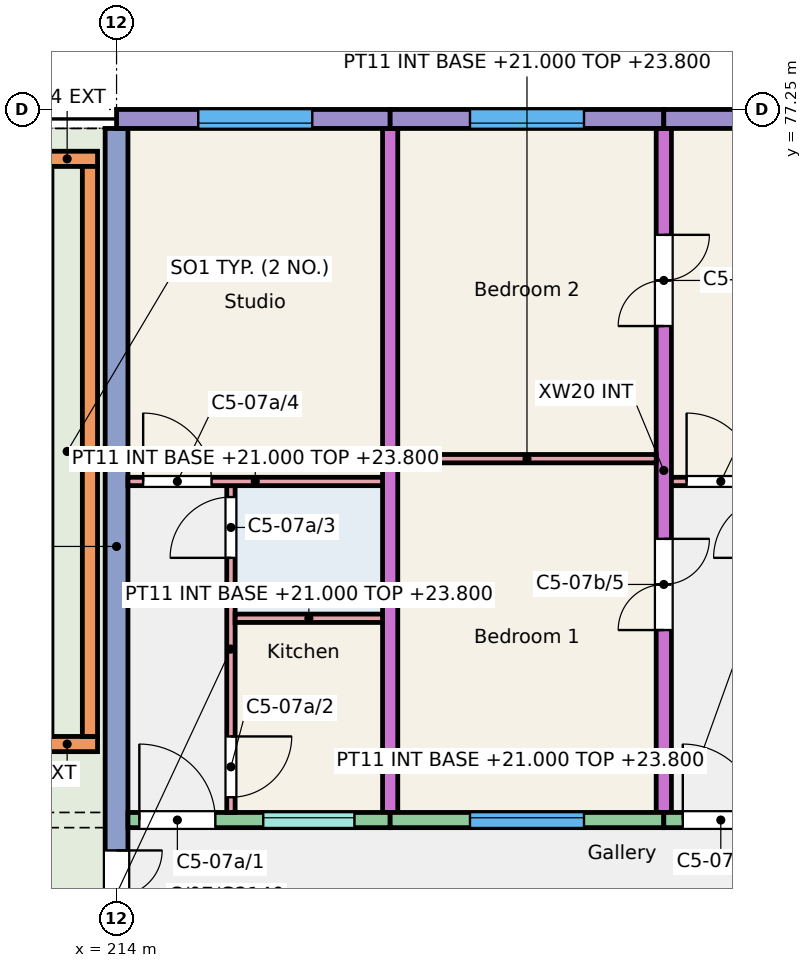
"""IFC4 building model, lengths in metres.
Left out: names, types, materials, properties, quantities, classifications, styles, units other than length and angle.
Written with IfcOpenShell. Run it as: python <this file> out.ifc"""

import sys

from ifc_helpers import new_model, si_unit, direction, frame, frame_2d, origin, place, context, subcontext, project, spatial, rectangle, extrude, element, fill, save


model = new_model("IFC4")
c1 = context("Model", 3, precision=1e-05, world=origin(), true_north=direction((0.0, 1.0)))
c2 = subcontext(c1, "Body", "Model", "MODEL_VIEW")
j1 = project(units=[si_unit("LENGTHUNIT", "METRE"), si_unit("PLANEANGLEUNIT", "RADIAN")], contexts=[c1])
p1 = place(None, origin())
s1 = spatial("IfcSite", under=j1, at=p1, CompositionType="ELEMENT")
p2 = place(p1, origin())
s2 = spatial("IfcBuilding", under=s1, at=p2, CompositionType="ELEMENT")
p3 = place(p2, frame((0.0, 0.0, 21.0)))
s3 = spatial("IfcBuildingStorey", under=s2, at=p3, CompositionType="ELEMENT", Elevation=21.0)
p4 = place(p3, frame((214.0, 66.0, 0.0), z_axis=(0.0, 0.0, 1.0), x_axis=(0.0, 1.0, 0.0)))
e1 = element("IfcWall", 1, at=p4, inside=s3, PredefinedType="SHEAR", context=c2, shape_type="SweptSolid", body=[
    extrude(rectangle(XDim=11.0, YDim=0.3, at=frame_2d((5.5, 0.0))), origin(), (0.0, 0.0, 1.0), 3.0),
])
p5 = place(p4, frame((0.3, 0.0, 0.0)))
e2 = element("IfcOpeningElement", 2, at=p5, cuts=e1, PredefinedType="OPENING", context=c2, shape_type="SweptSolid", body=[
    extrude(rectangle(XDim=1.2, YDim=2.1, at=frame_2d((0.6, 1.05))), frame((0.0, 0.16, 0.0), z_axis=(0.0, -1.0, 0.0), x_axis=(1.0, 0.0, 0.0)), (0.0, 0.0, 1.0), 0.32),
])
p6 = place(p3, frame((217.6, 68.0, 0.0), z_axis=(0.0, 0.0, 1.0), x_axis=(0.0, 1.0, 0.0)))
e3 = element("IfcWall", 3, at=p6, inside=s3, PredefinedType="SHEAR", context=c2, shape_type="SweptSolid", body=[
    extrude(rectangle(XDim=9.0, YDim=0.2, at=frame_2d((4.5, 0.0))), origin(), (0.0, 0.0, 1.0), 3.0),
])
p7 = place(p3, frame((221.2, 68.0, 0.0), z_axis=(0.0, 0.0, 1.0), x_axis=(0.0, 1.0, 0.0)))
e4 = element("IfcWall", 4, at=p7, inside=s3, PredefinedType="SHEAR", context=c2, shape_type="SweptSolid", body=[
    extrude(rectangle(XDim=9.0, YDim=0.2, at=frame_2d((4.5, 0.0))), origin(), (0.0, 0.0, 1.0), 3.0),
])
p8 = place(p7, frame((2.4, 0.0, 0.0)))
e5 = element("IfcOpeningElement", 5, at=p8, cuts=e4, PredefinedType="OPENING", context=c2, shape_type="SweptSolid", body=[
    extrude(rectangle(XDim=1.2, YDim=2.1, at=frame_2d((0.6, 1.05))), frame((0.0, 0.11, 0.0), z_axis=(0.0, -1.0, 0.0), x_axis=(1.0, 0.0, 0.0)), (0.0, 0.0, 1.0), 0.22),
])
p9 = place(p7, frame((6.4, 0.0, 0.0)))
e6 = element("IfcOpeningElement", 6, at=p9, cuts=e4, PredefinedType="OPENING", context=c2, shape_type="SweptSolid", body=[
    extrude(rectangle(XDim=1.2, YDim=2.1, at=frame_2d((0.6, 1.05))), frame((0.0, 0.11, 0.0), z_axis=(0.0, -1.0, 0.0), x_axis=(1.0, 0.0, 0.0)), (0.0, 0.0, 1.0), 0.22),
])
p10 = place(p3, frame((214.0, 77.125, 0.0), z_axis=(0.0, 0.0, 1.0), x_axis=(1.0, 0.0, 0.0)))
e7 = element("IfcWall", 7, at=p10, inside=s3, PredefinedType="SOLIDWALL", context=c2, shape_type="SweptSolid", body=[
    extrude(rectangle(XDim=3.6, YDim=0.25, at=frame_2d((1.8, 0.0))), origin(), (0.0, 0.0, 1.0), 3.0),
])
p11 = place(p10, frame((1.075, 0.0, 0.9)))
e8 = element("IfcOpeningElement", 8, at=p11, cuts=e7, PredefinedType="OPENING", context=c2, shape_type="SweptSolid", body=[
    extrude(rectangle(XDim=1.5, YDim=1.5, at=frame_2d((0.75, 0.75))), frame((0.0, 0.135, 0.0), z_axis=(0.0, -1.0, 0.0), x_axis=(1.0, 0.0, 0.0)), (0.0, 0.0, 1.0), 0.27),
])
p12 = place(p3, frame((214.15, 67.9, 0.0), z_axis=(0.0, 0.0, 1.0), x_axis=(1.0, 0.0, 0.0)))
e9 = element("IfcWall", 9, at=p12, inside=s3, PredefinedType="SOLIDWALL", context=c2, shape_type="SweptSolid", body=[
    extrude(rectangle(XDim=3.45, YDim=0.2, at=frame_2d((1.725, 0.0))), origin(), (0.0, 0.0, 1.0), 3.0),
])
p13 = place(p12, frame((1.78, 0.0, 1.1)))
e10 = element("IfcOpeningElement", 10, at=p13, cuts=e9, PredefinedType="OPENING", context=c2, shape_type="SweptSolid", body=[
    extrude(rectangle(XDim=1.2, YDim=1.3, at=frame_2d((0.6, 0.65))), frame((0.0, 0.11, 0.0), z_axis=(0.0, -1.0, 0.0), x_axis=(1.0, 0.0, 0.0)), (0.0, 0.0, 1.0), 0.22),
])
p14 = place(p12, frame((0.15, 0.0, 0.0)))
e11 = element("IfcOpeningElement", 11, at=p14, cuts=e9, PredefinedType="OPENING", context=c2, shape_type="SweptSolid", body=[
    extrude(rectangle(XDim=1.0, YDim=2.1, at=frame_2d((0.5, 1.05))), frame((0.0, 0.11, 0.0), z_axis=(0.0, -1.0, 0.0), x_axis=(1.0, 0.0, 0.0)), (0.0, 0.0, 1.0), 0.22),
])
p15 = place(p3, frame((217.6, 77.125, 0.0), z_axis=(0.0, 0.0, 1.0), x_axis=(1.0, 0.0, 0.0)))
e12 = element("IfcWall", 12, at=p15, inside=s3, PredefinedType="SOLIDWALL", context=c2, shape_type="SweptSolid", body=[
    extrude(rectangle(XDim=3.6, YDim=0.25, at=frame_2d((1.8, 0.0))), origin(), (0.0, 0.0, 1.0), 3.0),
])
p16 = place(p15, frame((1.05, 0.0, 0.9)))
e13 = element("IfcOpeningElement", 13, at=p16, cuts=e12, PredefinedType="OPENING", context=c2, shape_type="SweptSolid", body=[
    extrude(rectangle(XDim=1.5, YDim=1.5, at=frame_2d((0.75, 0.75))), frame((0.0, 0.135, 0.0), z_axis=(0.0, -1.0, 0.0), x_axis=(1.0, 0.0, 0.0)), (0.0, 0.0, 1.0), 0.27),
])
p17 = place(p3, frame((217.6, 67.9, 0.0), z_axis=(0.0, 0.0, 1.0), x_axis=(1.0, 0.0, 0.0)))
e14 = element("IfcWall", 14, at=p17, inside=s3, PredefinedType="SOLIDWALL", context=c2, shape_type="SweptSolid", body=[
    extrude(rectangle(XDim=3.6, YDim=0.2, at=frame_2d((1.8, 0.0))), origin(), (0.0, 0.0, 1.0), 3.0),
])
p18 = place(p17, frame((1.05, 0.0, 0.9)))
e15 = element("IfcOpeningElement", 15, at=p18, cuts=e14, PredefinedType="OPENING", context=c2, shape_type="SweptSolid", body=[
    extrude(rectangle(XDim=1.5, YDim=1.5, at=frame_2d((0.75, 0.75))), frame((0.0, 0.11, 0.0), z_axis=(0.0, -1.0, 0.0), x_axis=(1.0, 0.0, 0.0)), (0.0, 0.0, 1.0), 0.22),
])
p19 = place(p3, frame((221.2, 77.125, 0.0), z_axis=(0.0, 0.0, 1.0), x_axis=(1.0, 0.0, 0.0)))
e16 = element("IfcWall", 16, at=p19, inside=s3, PredefinedType="SOLIDWALL", context=c2, shape_type="SweptSolid", body=[
    extrude(rectangle(XDim=3.6, YDim=0.25, at=frame_2d((1.8, 0.0))), origin(), (0.0, 0.0, 1.0), 3.0),
])
p20 = place(p19, frame((1.038, 0.0, 0.9)))
e17 = element("IfcOpeningElement", 17, at=p20, cuts=e16, PredefinedType="OPENING", context=c2, shape_type="SweptSolid", body=[
    extrude(rectangle(XDim=1.5, YDim=1.5, at=frame_2d((0.75, 0.75))), frame((0.0, 0.135, 0.0), z_axis=(0.0, -1.0, 0.0), x_axis=(1.0, 0.0, 0.0)), (0.0, 0.0, 1.0), 0.27),
])
p21 = place(p3, frame((221.2, 67.9, 0.0), z_axis=(0.0, 0.0, 1.0), x_axis=(1.0, 0.0, 0.0)))
e18 = element("IfcWall", 18, at=p21, inside=s3, PredefinedType="SOLIDWALL", context=c2, shape_type="SweptSolid", body=[
    extrude(rectangle(XDim=3.6, YDim=0.2, at=frame_2d((1.8, 0.0))), origin(), (0.0, 0.0, 1.0), 3.0),
])
p22 = place(p21, frame((1.893, 0.0, 1.1)))
e19 = element("IfcOpeningElement", 19, at=p22, cuts=e18, PredefinedType="OPENING", context=c2, shape_type="SweptSolid", body=[
    extrude(rectangle(XDim=1.2, YDim=1.3, at=frame_2d((0.6, 0.65))), frame((0.0, 0.11, 0.0), z_axis=(0.0, -1.0, 0.0), x_axis=(1.0, 0.0, 0.0)), (0.0, 0.0, 1.0), 0.22),
])
p23 = place(p21, frame((0.25, 0.0, 0.0)))
e20 = element("IfcOpeningElement", 20, at=p23, cuts=e18, PredefinedType="OPENING", context=c2, shape_type="SweptSolid", body=[
    extrude(rectangle(XDim=1.0, YDim=2.1, at=frame_2d((0.5, 1.05))), frame((0.0, 0.11, 0.0), z_axis=(0.0, -1.0, 0.0), x_axis=(1.0, 0.0, 0.0)), (0.0, 0.0, 1.0), 0.22),
])
for number, where, z_axis, x_axis in (
    (21, (212.95, 68.9, 0.01), (0.0, 0.0, 1.0), (1.0, 0.0, 0.0)),
    (22, (212.95, 76.6, 0.01), (0.0, 0.0, 1.0), (1.0, 0.0, 0.0)),
):
    element("IfcWall", number, at=place(p3, frame(where, z_axis=z_axis, x_axis=x_axis)), inside=s3, PredefinedType="SOLIDWALL", context=c2, shape_type="SweptSolid", body=[
        extrude(rectangle(XDim=0.8, YDim=0.2, at=frame_2d((0.4, 0.0))), origin(), (0.0, 0.0, 1.0), 0.45),
    ])
for number, where, z_axis, x_axis in (
    (23, (213.05, 69.0, 0.01), (0.0, 0.0, 1.0), (0.0, 1.0, 0.0)),
    (24, (213.65, 69.0, 0.01), (0.0, 0.0, 1.0), (0.0, 1.0, 0.0)),
):
    element("IfcWall", number, at=place(p3, frame(where, z_axis=z_axis, x_axis=x_axis)), inside=s3, PredefinedType="SOLIDWALL", context=c2, shape_type="SweptSolid", body=[
        extrude(rectangle(XDim=7.5, YDim=0.2, at=frame_2d((3.75, 0.0))), origin(), (0.0, 0.0, 1.0), 0.45),
    ])
p24 = place(p3, frame((215.505, 68.0, 0.0), z_axis=(0.0, 0.0, 1.0), x_axis=(0.0, 1.0, 0.0)))
e25 = element("IfcWall", 25, at=p24, inside=s3, PredefinedType="PARTITIONING", context=c2, shape_type="SweptSolid", body=[
    extrude(rectangle(XDim=4.3, YDim=0.11, at=frame_2d((2.15, 0.0))), origin(), (0.0, 0.0, 1.0), 2.8),
])
p25 = place(p24, frame((0.2, 0.0, 0.0)))
e26 = element("IfcOpeningElement", 26, at=p25, cuts=e25, PredefinedType="OPENING", context=c2, shape_type="SweptSolid", body=[
    extrude(rectangle(XDim=0.8, YDim=2.1, at=frame_2d((0.4, 1.05))), frame((0.0, 0.065, 0.0), z_axis=(0.0, -1.0, 0.0), x_axis=(1.0, 0.0, 0.0)), (0.0, 0.0, 1.0), 0.13),
])
p26 = place(p24, frame((3.35, 0.0, 0.0)))
e27 = element("IfcOpeningElement", 27, at=p26, cuts=e25, PredefinedType="OPENING", context=c2, shape_type="SweptSolid", body=[
    extrude(rectangle(XDim=0.8, YDim=2.1, at=frame_2d((0.4, 1.05))), frame((0.0, 0.065, 0.0), z_axis=(0.0, -1.0, 0.0), x_axis=(1.0, 0.0, 0.0)), (0.0, 0.0, 1.0), 0.13),
])
p27 = place(p3, frame((215.56, 70.555, 0.0), z_axis=(0.0, 0.0, 1.0), x_axis=(1.0, 0.0, 0.0)))
e28 = element("IfcWall", 28, at=p27, inside=s3, PredefinedType="PARTITIONING", context=c2, shape_type="SweptSolid", body=[
    extrude(rectangle(XDim=1.94, YDim=0.11, at=frame_2d((0.97, 0.0))), origin(), (0.0, 0.0, 1.0), 2.8),
])
p28 = place(p3, frame((214.15, 72.355, 0.0), z_axis=(0.0, 0.0, 1.0), x_axis=(1.0, 0.0, 0.0)))
e29 = element("IfcWall", 29, at=p28, inside=s3, PredefinedType="PARTITIONING", context=c2, shape_type="SweptSolid", body=[
    extrude(rectangle(XDim=3.35, YDim=0.11, at=frame_2d((1.675, 0.0))), origin(), (0.0, 0.0, 1.0), 2.8),
])
p29 = place(p28, frame((0.2, 0.0, 0.0)))
e30 = element("IfcOpeningElement", 30, at=p29, cuts=e29, PredefinedType="OPENING", context=c2, shape_type="SweptSolid", body=[
    extrude(rectangle(XDim=0.9, YDim=2.1, at=frame_2d((0.45, 1.05))), frame((0.0, 0.065, 0.0), z_axis=(0.0, -1.0, 0.0), x_axis=(1.0, 0.0, 0.0)), (0.0, 0.0, 1.0), 0.13),
])
p30 = place(p3, frame((221.3, 72.355, 0.0), z_axis=(0.0, 0.0, 1.0), x_axis=(1.0, 0.0, 0.0)))
e31 = element("IfcWall", 31, at=p30, inside=s3, PredefinedType="PARTITIONING", context=c2, shape_type="SweptSolid", body=[
    extrude(rectangle(XDim=3.375, YDim=0.11, at=frame_2d((1.688, 0.0))), origin(), (0.0, 0.0, 1.0), 2.8),
])
p31 = place(p30, frame((0.2, 0.0, 0.0)))
e32 = element("IfcOpeningElement", 32, at=p31, cuts=e31, PredefinedType="OPENING", context=c2, shape_type="SweptSolid", body=[
    extrude(rectangle(XDim=0.9, YDim=2.1, at=frame_2d((0.45, 1.05))), frame((0.0, 0.065, 0.0), z_axis=(0.0, -1.0, 0.0), x_axis=(1.0, 0.0, 0.0)), (0.0, 0.0, 1.0), 0.13),
])
p32 = place(p3, frame((217.7, 72.655, 0.0), z_axis=(0.0, 0.0, 1.0), x_axis=(1.0, 0.0, 0.0)))
e33 = element("IfcWall", 33, at=p32, inside=s3, PredefinedType="PARTITIONING", context=c2, shape_type="SweptSolid", body=[
    extrude(rectangle(XDim=3.4, YDim=0.11, at=frame_2d((1.7, 0.0))), origin(), (0.0, 0.0, 1.0), 2.8),
])
p33 = place(p13, origin())
e34 = element("IfcWindow", 34, at=p33, inside=s3, PartitioningType="SINGLE_PANEL", PredefinedType="WINDOW", context=c2, shape_type="SweptSolid", body=[
    extrude(rectangle(XDim=1.2, YDim=1.3, at=frame_2d((0.6, 0.65))), frame((0.0, 0.06, 0.0), z_axis=(0.0, -1.0, 0.0), x_axis=(1.0, 0.0, 0.0)), (0.0, 0.0, 1.0), 0.06),
])
fill(e10, e34)
p34 = place(p11, origin())
e35 = element("IfcWindow", 35, at=p34, inside=s3, PartitioningType="SINGLE_PANEL", PredefinedType="WINDOW", context=c2, shape_type="SweptSolid", body=[
    extrude(rectangle(XDim=1.5, YDim=1.5, at=frame_2d((0.75, 0.75))), frame((0.0, -0.025, 0.0), z_axis=(0.0, -1.0, 0.0), x_axis=(1.0, 0.0, 0.0)), (0.0, 0.0, 1.0), 0.06),
])
fill(e8, e35)
p35 = place(p18, origin())
e36 = element("IfcWindow", 36, at=p35, inside=s3, PartitioningType="SINGLE_PANEL", PredefinedType="WINDOW", context=c2, shape_type="SweptSolid", body=[
    extrude(rectangle(XDim=1.5, YDim=1.5, at=frame_2d((0.75, 0.75))), frame((0.0, 0.06, 0.0), z_axis=(0.0, -1.0, 0.0), x_axis=(1.0, 0.0, 0.0)), (0.0, 0.0, 1.0), 0.06),
])
fill(e15, e36)
p36 = place(p16, origin())
e37 = element("IfcWindow", 37, at=p36, inside=s3, PartitioningType="SINGLE_PANEL", PredefinedType="WINDOW", context=c2, shape_type="SweptSolid", body=[
    extrude(rectangle(XDim=1.5, YDim=1.5, at=frame_2d((0.75, 0.75))), frame((0.0, -0.025, 0.0), z_axis=(0.0, -1.0, 0.0), x_axis=(1.0, 0.0, 0.0)), (0.0, 0.0, 1.0), 0.06),
])
fill(e13, e37)
p37 = place(p14, origin())
e38 = element("IfcDoor", 38, at=p37, inside=s3, OperationType="SINGLE_SWING_LEFT", PredefinedType="DOOR", context=c2, shape_type="SweptSolid", body=[
    extrude(rectangle(XDim=1.0, YDim=2.1, at=frame_2d((0.5, 1.05))), frame((0.0, 0.025, 0.0), z_axis=(0.0, -1.0, 0.0), x_axis=(1.0, 0.0, 0.0)), (0.0, 0.0, 1.0), 0.05),
])
fill(e11, e38)
p38 = place(p25, origin())
e39 = element("IfcDoor", 39, at=p38, inside=s3, OperationType="SINGLE_SWING_RIGHT", PredefinedType="DOOR", context=c2, shape_type="SweptSolid", body=[
    extrude(rectangle(XDim=0.8, YDim=2.1, at=frame_2d((0.4, 1.05))), frame((0.0, 0.025, 0.0), z_axis=(0.0, -1.0, 0.0), x_axis=(1.0, 0.0, 0.0)), (0.0, 0.0, 1.0), 0.05),
])
fill(e26, e39)
p39 = place(p26, origin())
e40 = element("IfcDoor", 40, at=p39, inside=s3, OperationType="SINGLE_SWING_LEFT", PredefinedType="DOOR", context=c2, shape_type="SweptSolid", body=[
    extrude(rectangle(XDim=0.8, YDim=2.1, at=frame_2d((0.4, 1.05))), frame((0.0, 0.025, 0.0), z_axis=(0.0, -1.0, 0.0), x_axis=(1.0, 0.0, 0.0)), (0.0, 0.0, 1.0), 0.05),
])
fill(e27, e40)
p40 = place(p29, origin())
e41 = element("IfcDoor", 41, at=p40, inside=s3, OperationType="SINGLE_SWING_LEFT", PredefinedType="DOOR", context=c2, shape_type="SweptSolid", body=[
    extrude(rectangle(XDim=0.9, YDim=2.1, at=frame_2d((0.45, 1.05))), frame((0.0, 0.025, 0.0), z_axis=(0.0, -1.0, 0.0), x_axis=(1.0, 0.0, 0.0)), (0.0, 0.0, 1.0), 0.05),
])
fill(e30, e41)
p41 = place(p23, origin())
e42 = element("IfcDoor", 42, at=p41, inside=s3, OperationType="SINGLE_SWING_LEFT", PredefinedType="DOOR", context=c2, shape_type="SweptSolid", body=[
    extrude(rectangle(XDim=1.0, YDim=2.1, at=frame_2d((0.5, 1.05))), frame((0.0, 0.025, 0.0), z_axis=(0.0, -1.0, 0.0), x_axis=(1.0, 0.0, 0.0)), (0.0, 0.0, 1.0), 0.05),
])
fill(e20, e42)
p42 = place(p31, origin())
e43 = element("IfcDoor", 43, at=p42, inside=s3, OperationType="SINGLE_SWING_LEFT", PredefinedType="DOOR", context=c2, shape_type="SweptSolid", body=[
    extrude(rectangle(XDim=0.9, YDim=2.1, at=frame_2d((0.45, 1.05))), frame((0.0, 0.025, 0.0), z_axis=(0.0, -1.0, 0.0), x_axis=(1.0, 0.0, 0.0)), (0.0, 0.0, 1.0), 0.05),
])
fill(e32, e43)
p43 = place(p8, origin())
e44 = element("IfcDoor", 44, at=p43, inside=s3, OperationType="DOUBLE_DOOR_SINGLE_SWING", PredefinedType="DOOR", context=c2, shape_type="SweptSolid", body=[
    extrude(rectangle(XDim=1.2, YDim=2.1, at=frame_2d((0.6, 1.05))), frame((0.0, 0.025, 0.0), z_axis=(0.0, -1.0, 0.0), x_axis=(1.0, 0.0, 0.0)), (0.0, 0.0, 1.0), 0.05),
])
fill(e5, e44)
p44 = place(p9, origin())
e45 = element("IfcDoor", 45, at=p44, inside=s3, OperationType="DOUBLE_DOOR_SINGLE_SWING", PredefinedType="DOOR", context=c2, shape_type="SweptSolid", body=[
    extrude(rectangle(XDim=1.2, YDim=2.1, at=frame_2d((0.6, 1.05))), frame((0.0, 0.025, 0.0), z_axis=(0.0, -1.0, 0.0), x_axis=(1.0, 0.0, 0.0)), (0.0, 0.0, 1.0), 0.05),
])
fill(e6, e45)
p45 = place(p5, origin())
e46 = element("IfcDoor", 46, at=p45, inside=s3, OperationType="DOUBLE_DOOR_SINGLE_SWING", PredefinedType="DOOR", context=c2, shape_type="SweptSolid", body=[
    extrude(rectangle(XDim=1.2, YDim=2.1, at=frame_2d((0.6, 1.05))), frame((0.0, 0.025, 0.0), z_axis=(0.0, -1.0, 0.0), x_axis=(1.0, 0.0, 0.0)), (0.0, 0.0, 1.0), 0.05),
])
fill(e2, e46)
save(model, sys.argv[1])
